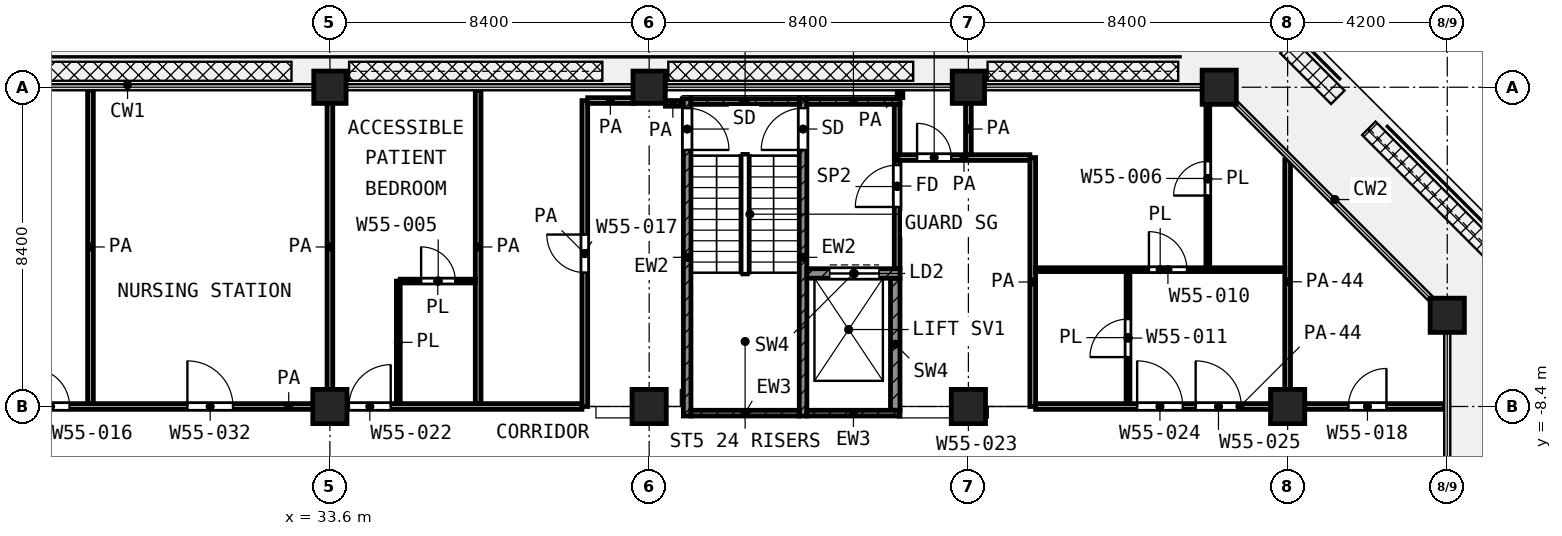
"""IFC4 building model, lengths in metres.
Left out: names, types, materials, properties, quantities, classifications, styles, units other than length and angle.
Written with IfcOpenShell. Run it as: python <this file> out.ifc"""

import sys

from ifc_helpers import new_model, si_unit, direction, frame, frame_2d, origin, origin_2d, place, context, subcontext, project, spatial, rectangle, extrude, element, fill, save


model = new_model("IFC4")
c1 = context("Model", 3, precision=1e-05, world=origin(), true_north=direction((0.0, 1.0)))
c2 = subcontext(c1, "Body", "Model", "MODEL_VIEW")
j1 = project(units=[si_unit("LENGTHUNIT", "METRE"), si_unit("PLANEANGLEUNIT", "RADIAN")], contexts=[c1])
p1 = place(None, origin())
s1 = spatial("IfcSite", under=j1, at=p1, CompositionType="ELEMENT")
p2 = place(p1, origin())
s2 = spatial("IfcBuilding", under=s1, at=p2, CompositionType="ELEMENT")
p3 = place(p2, frame((0.0, 0.0, 239.0)))
s3 = spatial("IfcBuildingStorey", under=s2, at=p3, CompositionType="ELEMENT", Elevation=239.0)
for number, where, z_axis, x_axis in (
    (1, (33.6, 0.0, 0.0), (0.0, 0.0, 1.0), (1.0, 0.0, 0.0)),
    (2, (42.0, 0.0, 0.0), (0.0, 0.0, 1.0), (1.0, 0.0, 0.0)),
    (3, (50.4, 0.0, 0.0), (0.0, 0.0, 1.0), (1.0, 0.0, 0.0)),
):
    element("IfcColumn", number, at=place(p3, frame(where, z_axis=z_axis, x_axis=x_axis)), inside=s3, PredefinedType="COLUMN", context=c2, shape_type="SweptSolid", body=[
        extrude(rectangle(XDim=0.85, YDim=0.85, at=origin_2d()), origin(), (0.0, 0.0, 1.0), 4.2),
    ])
for number, where, z_axis, x_axis in (
    (4, (57.0, 0.0, 0.0), (0.0, 0.0, 1.0), (1.0, 0.0, 0.0)),
    (5, (63.0, -6.0, 0.0), (0.0, 0.0, 1.0), (1.0, 0.0, 0.0)),
    (6, (33.6, -8.4, 0.0), (0.0, 0.0, 1.0), (1.0, 0.0, 0.0)),
    (7, (42.0, -8.4, 0.0), (0.0, 0.0, 1.0), (1.0, 0.0, 0.0)),
    (8, (50.4, -8.4, 0.0), (0.0, 0.0, 1.0), (1.0, 0.0, 0.0)),
    (9, (58.8, -8.4, 0.0), (0.0, 0.0, 1.0), (1.0, 0.0, 0.0)),
):
    element("IfcColumn", number, at=place(p3, frame(where, z_axis=z_axis, x_axis=x_axis)), inside=s3, PredefinedType="COLUMN", context=c2, shape_type="SweptSolid", body=[
        extrude(rectangle(XDim=0.9, YDim=0.9, at=origin_2d()), origin(), (0.0, 0.0, 1.0), 4.2),
    ])
p4 = place(p3, frame((43.0, -8.65, 0.0), z_axis=(0.0, 0.0, 1.0), x_axis=(0.0, 1.0, 0.0)))
e10 = element("IfcWall", 10, at=p4, inside=s3, PredefinedType="SHEAR", context=c2, shape_type="SweptSolid", body=[
    extrude(rectangle(XDim=8.35, YDim=0.2, at=frame_2d((4.175, 0.0))), origin(), (0.0, 0.0, 1.0), 3.6),
])
p5 = place(p4, frame((7.0, 0.0, 0.0)))
e11 = element("IfcOpeningElement", 11, at=p5, cuts=e10, PredefinedType="OPENING", context=c2, shape_type="SweptSolid", body=[
    extrude(rectangle(XDim=1.1, YDim=2.1, at=frame_2d((0.55, 1.05))), frame((0.0, 0.11, 0.0), z_axis=(0.0, -1.0, 0.0), x_axis=(1.0, 0.0, 0.0)), (0.0, 0.0, 1.0), 0.22),
])
p6 = place(p3, frame((46.05, -8.65, 0.0), z_axis=(0.0, 0.0, 1.0), x_axis=(0.0, 1.0, 0.0)))
e12 = element("IfcWall", 12, at=p6, inside=s3, PredefinedType="SHEAR", context=c2, shape_type="SweptSolid", body=[
    extrude(rectangle(XDim=8.35, YDim=0.2, at=frame_2d((4.175, 0.0))), origin(), (0.0, 0.0, 1.0), 3.6),
])
p7 = place(p6, frame((7.0, 0.0, 0.0)))
e13 = element("IfcOpeningElement", 13, at=p7, cuts=e12, PredefinedType="OPENING", context=c2, shape_type="SweptSolid", body=[
    extrude(rectangle(XDim=1.1, YDim=2.1, at=frame_2d((0.55, 1.05))), frame((0.0, 0.11, 0.0), z_axis=(0.0, -1.0, 0.0), x_axis=(1.0, 0.0, 0.0)), (0.0, 0.0, 1.0), 0.22),
])
p8 = place(p3, frame((43.1, -0.375, 0.0), z_axis=(0.0, 0.0, 1.0), x_axis=(1.0, 0.0, 0.0)))
e14 = element("IfcWall", 14, at=p8, inside=s3, PredefinedType="SHEAR", context=c2, shape_type="SweptSolid", body=[
    extrude(rectangle(XDim=2.85, YDim=0.15, at=frame_2d((1.425, 0.0))), origin(), (0.0, 0.0, 1.0), 3.6),
])
p9 = place(p3, frame((46.15, -0.375, 0.0), z_axis=(0.0, 0.0, 1.0), x_axis=(1.0, 0.0, 0.0)))
e15 = element("IfcWall", 15, at=p9, inside=s3, PredefinedType="SHEAR", context=c2, shape_type="SweptSolid", body=[
    extrude(rectangle(XDim=2.45, YDim=0.15, at=frame_2d((1.225, 0.0))), origin(), (0.0, 0.0, 1.0), 3.6),
])
p10 = place(p3, frame((43.1, -8.575, 0.0), z_axis=(0.0, 0.0, 1.0), x_axis=(1.0, 0.0, 0.0)))
e16 = element("IfcWall", 16, at=p10, inside=s3, PredefinedType="SHEAR", context=c2, shape_type="SweptSolid", body=[
    extrude(rectangle(XDim=2.85, YDim=0.15, at=frame_2d((1.425, 0.0))), origin(), (0.0, 0.0, 1.0), 3.6),
])
p11 = place(p3, frame((46.15, -8.575, 0.0), z_axis=(0.0, 0.0, 1.0), x_axis=(1.0, 0.0, 0.0)))
e17 = element("IfcWall", 17, at=p11, inside=s3, PredefinedType="SHEAR", context=c2, shape_type="SweptSolid", body=[
    extrude(rectangle(XDim=2.45, YDim=0.15, at=frame_2d((1.225, 0.0))), origin(), (0.0, 0.0, 1.0), 3.6),
])
p12 = place(p3, frame((46.15, -4.9, 0.0), z_axis=(0.0, 0.0, 1.0), x_axis=(1.0, 0.0, 0.0)))
e18 = element("IfcWall", 18, at=p12, inside=s3, PredefinedType="SHEAR", context=c2, shape_type="SweptSolid", body=[
    extrude(rectangle(XDim=2.45, YDim=0.25, at=frame_2d((1.225, 0.0))), origin(), (0.0, 0.0, 1.0), 3.6),
])
p13 = place(p12, frame((0.6, 0.0, 0.0)))
e19 = element("IfcOpeningElement", 19, at=p13, cuts=e18, PredefinedType="OPENING", context=c2, shape_type="SweptSolid", body=[
    extrude(rectangle(XDim=1.3, YDim=2.1, at=frame_2d((0.65, 1.05))), frame((0.0, 0.135, 0.0), z_axis=(0.0, -1.0, 0.0), x_axis=(1.0, 0.0, 0.0)), (0.0, 0.0, 1.0), 0.27),
])
p14 = place(p3, frame((48.475, -8.5, 0.0), z_axis=(0.0, 0.0, 1.0), x_axis=(0.0, 1.0, 0.0)))
e20 = element("IfcWall", 20, at=p14, inside=s3, PredefinedType="SHEAR", context=c2, shape_type="SweptSolid", body=[
    extrude(rectangle(XDim=3.475, YDim=0.25, at=frame_2d((1.738, 0.0))), origin(), (0.0, 0.0, 1.0), 3.6),
])
p15 = place(p3, frame((48.525, -4.775, 0.0), z_axis=(0.0, 0.0, 1.0), x_axis=(0.0, 1.0, 0.0)))
e21 = element("IfcWall", 21, at=p15, inside=s3, PredefinedType="PARTITIONING", context=c2, shape_type="SweptSolid", body=[
    extrude(rectangle(XDim=4.325, YDim=0.15, at=frame_2d((2.163, 0.0))), origin(), (0.0, 0.0, 1.0), 3.6),
])
p16 = place(p15, frame((1.625, 0.0, 0.0)))
e22 = element("IfcOpeningElement", 22, at=p16, cuts=e21, PredefinedType="OPENING", context=c2, shape_type="SweptSolid", body=[
    extrude(rectangle(XDim=1.1, YDim=2.1, at=frame_2d((0.55, 1.05))), frame((0.0, 0.085, 0.0), z_axis=(0.0, -1.0, 0.0), x_axis=(1.0, 0.0, 0.0)), (0.0, 0.0, 1.0), 0.17),
])
p17 = place(p3, frame((35.45, -5.1, 0.0), z_axis=(0.0, 0.0, 1.0), x_axis=(1.0, 0.0, 0.0)))
e23 = element("IfcWall", 23, at=p17, inside=s3, PredefinedType="PARTITIONING", context=c2, shape_type="SweptSolid", body=[
    extrude(rectangle(XDim=1.975, YDim=0.1, at=frame_2d((0.988, 0.0))), origin(), (0.0, 0.0, 1.0), 3.6),
])
p18 = place(p17, frame((0.55, 0.0, 0.0)))
e24 = element("IfcOpeningElement", 24, at=p18, cuts=e23, PredefinedType="OPENING", context=c2, shape_type="SweptSolid", body=[
    extrude(rectangle(XDim=0.9, YDim=2.1, at=frame_2d((0.45, 1.05))), frame((0.0, 0.06, 0.0), z_axis=(0.0, -1.0, 0.0), x_axis=(1.0, 0.0, 0.0)), (0.0, 0.0, 1.0), 0.12),
])
p19 = place(p3, frame((52.168, -4.8, 0.0), z_axis=(0.0, 0.0, 1.0), x_axis=(1.0, 0.0, 0.0)))
e25 = element("IfcWall", 25, at=p19, inside=s3, PredefinedType="PARTITIONING", context=c2, shape_type="SweptSolid", body=[
    extrude(rectangle(XDim=6.557, YDim=0.1, at=frame_2d((3.279, 0.0))), origin(), (0.0, 0.0, 1.0), 3.6),
])
p20 = place(p19, frame((2.982, 0.0, 0.0)))
e26 = element("IfcOpeningElement", 26, at=p20, cuts=e25, PredefinedType="OPENING", context=c2, shape_type="SweptSolid", body=[
    extrude(rectangle(XDim=1.0, YDim=2.1, at=frame_2d((0.5, 1.05))), frame((0.0, 0.06, 0.0), z_axis=(0.0, -1.0, 0.0), x_axis=(1.0, 0.0, 0.0)), (0.0, 0.0, 1.0), 0.12),
])
p21 = place(p3, frame((35.4, -8.325, 0.0), z_axis=(0.0, 0.0, 1.0), x_axis=(0.0, 1.0, 0.0)))
e27 = element("IfcWall", 27, at=p21, inside=s3, PredefinedType="PARTITIONING", context=c2, shape_type="SweptSolid", body=[
    extrude(rectangle(XDim=3.225, YDim=0.1, at=frame_2d((1.612, 0.0))), origin(), (0.0, 0.0, 1.0), 3.6),
])
p22 = place(p3, frame((54.6, -8.325, 0.0), z_axis=(0.0, 0.0, 1.0), x_axis=(0.0, 1.0, 0.0)))
e28 = element("IfcWall", 28, at=p22, inside=s3, PredefinedType="PARTITIONING", context=c2, shape_type="SweptSolid", body=[
    extrude(rectangle(XDim=3.475, YDim=0.1, at=frame_2d((1.737, 0.0))), origin(), (0.0, 0.0, 1.0), 3.6),
])
p23 = place(p22, frame((1.225, 0.0, 0.0)))
e29 = element("IfcOpeningElement", 29, at=p23, cuts=e28, PredefinedType="OPENING", context=c2, shape_type="SweptSolid", body=[
    extrude(rectangle(XDim=1.0, YDim=2.1, at=frame_2d((0.5, 1.05))), frame((0.0, 0.06, 0.0), z_axis=(0.0, -1.0, 0.0), x_axis=(1.0, 0.0, 0.0)), (0.0, 0.0, 1.0), 0.12),
])
p24 = place(p3, frame((56.7, -4.75, 0.0), z_axis=(0.0, 0.0, 1.0), x_axis=(0.0, 1.0, 0.0)))
e30 = element("IfcWall", 30, at=p24, inside=s3, PredefinedType="PARTITIONING", context=c2, shape_type="SweptSolid", body=[
    extrude(rectangle(XDim=4.67, YDim=0.1, at=frame_2d((2.335, 0.0))), origin(), (0.0, 0.0, 1.0), 3.6),
])
p25 = place(p24, frame((1.9, 0.0, 0.0)))
e31 = element("IfcOpeningElement", 31, at=p25, cuts=e30, PredefinedType="OPENING", context=c2, shape_type="SweptSolid", body=[
    extrude(rectangle(XDim=0.9, YDim=2.1, at=frame_2d((0.45, 1.05))), frame((0.0, 0.06, 0.0), z_axis=(0.0, -1.0, 0.0), x_axis=(1.0, 0.0, 0.0)), (0.0, 0.0, 1.0), 0.12),
])
p26 = place(p3, frame((24.8, -8.4, 0.0), z_axis=(0.0, 0.0, 1.0), x_axis=(1.0, 0.0, 0.0)))
e32 = element("IfcWall", 32, at=p26, inside=s3, PredefinedType="PARTITIONING", context=c2, shape_type="SweptSolid", body=[
    extrude(rectangle(XDim=15.432, YDim=0.15, at=frame_2d((7.716, 0.0))), origin(), (0.0, 0.0, 1.0), 3.6),
])
p27 = place(p26, frame((9.3, 0.0, 0.0)))
e33 = element("IfcOpeningElement", 33, at=p27, cuts=e32, PredefinedType="OPENING", context=c2, shape_type="SweptSolid", body=[
    extrude(rectangle(XDim=1.1, YDim=2.1, at=frame_2d((0.55, 1.05))), frame((0.0, 0.085, 0.0), z_axis=(0.0, -1.0, 0.0), x_axis=(1.0, 0.0, 0.0)), (0.0, 0.0, 1.0), 0.17),
])
p28 = place(p26, frame((0.95, 0.0, 0.0)))
e34 = element("IfcOpeningElement", 34, at=p28, cuts=e32, PredefinedType="OPENING", context=c2, shape_type="SweptSolid", body=[
    extrude(rectangle(XDim=1.0, YDim=2.1, at=frame_2d((0.5, 1.05))), frame((0.0, 0.085, 0.0), z_axis=(0.0, -1.0, 0.0), x_axis=(1.0, 0.0, 0.0)), (0.0, 0.0, 1.0), 0.17),
])
p29 = place(p26, frame((5.05, 0.0, 0.0)))
e35 = element("IfcOpeningElement", 35, at=p29, cuts=e32, PredefinedType="OPENING", context=c2, shape_type="SweptSolid", body=[
    extrude(rectangle(XDim=1.2, YDim=2.1, at=frame_2d((0.6, 1.05))), frame((0.0, 0.085, 0.0), z_axis=(0.0, -1.0, 0.0), x_axis=(1.0, 0.0, 0.0)), (0.0, 0.0, 1.0), 0.17),
])
p30 = place(p3, frame((52.168, -8.4, 0.0), z_axis=(0.0, 0.0, 1.0), x_axis=(1.0, 0.0, 0.0)))
e36 = element("IfcWall", 36, at=p30, inside=s3, PredefinedType="PARTITIONING", context=c2, shape_type="SweptSolid", body=[
    extrude(rectangle(XDim=10.752, YDim=0.15, at=frame_2d((5.376, 0.0))), origin(), (0.0, 0.0, 1.0), 2.7),
])
p31 = place(p30, frame((2.672, 0.0, 0.0)))
e37 = element("IfcOpeningElement", 37, at=p31, cuts=e36, PredefinedType="OPENING", context=c2, shape_type="SweptSolid", body=[
    extrude(rectangle(XDim=1.2, YDim=2.1, at=frame_2d((0.6, 1.05))), frame((0.0, 0.085, 0.0), z_axis=(0.0, -1.0, 0.0), x_axis=(1.0, 0.0, 0.0)), (0.0, 0.0, 1.0), 0.17),
])
p32 = place(p30, frame((4.212, 0.0, 0.0)))
e38 = element("IfcOpeningElement", 38, at=p32, cuts=e36, PredefinedType="OPENING", context=c2, shape_type="SweptSolid", body=[
    extrude(rectangle(XDim=1.2, YDim=2.1, at=frame_2d((0.6, 1.05))), frame((0.0, 0.085, 0.0), z_axis=(0.0, -1.0, 0.0), x_axis=(1.0, 0.0, 0.0)), (0.0, 0.0, 1.0), 0.17),
])
p33 = place(p30, frame((8.232, 0.0, 0.0)))
e39 = element("IfcOpeningElement", 39, at=p33, cuts=e36, PredefinedType="OPENING", context=c2, shape_type="SweptSolid", body=[
    extrude(rectangle(XDim=1.0, YDim=2.1, at=frame_2d((0.5, 1.05))), frame((0.0, 0.085, 0.0), z_axis=(0.0, -1.0, 0.0), x_axis=(1.0, 0.0, 0.0)), (0.0, 0.0, 1.0), 0.17),
])
p34 = place(p3, frame((48.55, -1.85, 0.0), z_axis=(0.0, 0.0, 1.0), x_axis=(1.0, 0.0, 0.0)))
e40 = element("IfcWall", 40, at=p34, inside=s3, PredefinedType="PARTITIONING", context=c2, shape_type="SweptSolid", body=[
    extrude(rectangle(XDim=3.468, YDim=0.15, at=frame_2d((1.734, 0.0))), origin(), (0.0, 0.0, 1.0), 3.6),
])
p35 = place(p34, frame((0.5, 0.0, 0.0)))
e41 = element("IfcOpeningElement", 41, at=p35, cuts=e40, PredefinedType="OPENING", context=c2, shape_type="SweptSolid", body=[
    extrude(rectangle(XDim=0.9, YDim=2.1, at=frame_2d((0.45, 1.05))), frame((0.0, 0.085, 0.0), z_axis=(0.0, -1.0, 0.0), x_axis=(1.0, 0.0, 0.0)), (0.0, 0.0, 1.0), 0.17),
])
p36 = place(p3, frame((42.427, -0.425, 0.0), z_axis=(0.0, 0.0, 1.0), x_axis=(1.0, 0.0, 0.0)))
e42 = element("IfcWall", 42, at=p36, inside=s3, PredefinedType="PARTITIONING", context=c2, shape_type="SweptSolid", body=[
    extrude(rectangle(XDim=0.393, YDim=0.15, at=frame_2d((0.197, 0.0))), origin(), (0.0, 0.0, 1.0), 3.6),
])
p37 = place(p3, frame((40.383, -0.35, 0.0), z_axis=(0.0, 0.0, 1.0), x_axis=(1.0, 0.0, 0.0)))
e43 = element("IfcWall", 43, at=p37, inside=s3, PredefinedType="PARTITIONING", context=c2, shape_type="SweptSolid", body=[
    extrude(rectangle(XDim=1.192, YDim=0.15, at=frame_2d((0.596, 0.0))), origin(), (0.0, 0.0, 1.0), 3.6),
])
for number, where, z_axis, x_axis in (
    (44, (27.3, -8.325, 0.0), (0.0, 0.0, 1.0), (0.0, 1.0, 0.0)),
    (45, (33.6, -8.325, 0.0), (0.0, 0.0, 1.0), (0.0, 1.0, 0.0)),
    (46, (37.5, -8.325, 0.0), (0.0, 0.0, 1.0), (0.0, 1.0, 0.0)),
):
    element("IfcWall", number, at=place(p3, frame(where, z_axis=z_axis, x_axis=x_axis)), inside=s3, PredefinedType="PARTITIONING", context=c2, shape_type="SweptSolid", body=[
        extrude(rectangle(XDim=8.245, YDim=0.15, at=frame_2d((4.123, 0.0))), origin(), (0.0, 0.0, 1.0), 3.6),
    ])
p38 = place(p3, frame((40.307, -8.4, 0.0), z_axis=(0.0, 0.0, 1.0), x_axis=(0.0, 1.0, 0.0)))
e47 = element("IfcWall", 47, at=p38, inside=s3, PredefinedType="PARTITIONING", context=c2, shape_type="SweptSolid", body=[
    extrude(rectangle(XDim=8.048, YDim=0.15, at=frame_2d((4.024, 0.0))), origin(), (0.0, 0.0, 1.0), 3.6),
])
p39 = place(p38, frame((3.524, 0.0, 0.0)))
e48 = element("IfcOpeningElement", 48, at=p39, cuts=e47, PredefinedType="OPENING", context=c2, shape_type="SweptSolid", body=[
    extrude(rectangle(XDim=1.0, YDim=2.1, at=frame_2d((0.5, 1.05))), frame((0.0, 0.085, 0.0), z_axis=(0.0, -1.0, 0.0), x_axis=(1.0, 0.0, 0.0)), (0.0, 0.0, 1.0), 0.17),
])
p40 = place(p3, frame((48.6, -0.27, 0.0), z_axis=(0.0, 0.0, 1.0), x_axis=(0.0, 1.0, 0.0)))
e49 = element("IfcWall", 49, at=p40, inside=s3, PredefinedType="PARTITIONING", context=c2, shape_type="SweptSolid", body=[
    extrude(rectangle(XDim=0.19, YDim=0.15, at=frame_2d((0.095, 0.0))), origin(), (0.0, 0.0, 1.0), 3.6),
])
p41 = place(p3, frame((50.4, -1.775, 0.0), z_axis=(0.0, 0.0, 1.0), x_axis=(0.0, 1.0, 0.0)))
e50 = element("IfcWall", 50, at=p41, inside=s3, PredefinedType="PARTITIONING", context=c2, shape_type="SweptSolid", body=[
    extrude(rectangle(XDim=1.35, YDim=0.15, at=frame_2d((0.675, 0.0))), origin(), (0.0, 0.0, 1.0), 3.6),
])
p42 = place(p3, frame((52.093, -8.4, 0.0), z_axis=(0.0, 0.0, 1.0), x_axis=(0.0, 1.0, 0.0)))
e51 = element("IfcWall", 51, at=p42, inside=s3, PredefinedType="PARTITIONING", context=c2, shape_type="SweptSolid", body=[
    extrude(rectangle(XDim=6.55, YDim=0.15, at=frame_2d((3.275, 0.0))), origin(), (0.0, 0.0, 1.0), 3.6),
])
p43 = place(p3, frame((58.8, -8.325, 0.0), z_axis=(0.0, 0.0, 1.0), x_axis=(0.0, 1.0, 0.0)))
e52 = element("IfcWall", 52, at=p43, inside=s3, PredefinedType="PARTITIONING", context=c2, shape_type="SweptSolid", body=[
    extrude(rectangle(XDim=6.412, YDim=0.15, at=frame_2d((3.206, 0.0))), origin(), (0.0, 0.0, 1.0), 2.7),
])
p44 = place(p5, frame((1.1, 0.0, 0.0), z_axis=(0.0, 0.0, 1.0), x_axis=(-1.0, 0.0, 0.0)))
e53 = element("IfcDoor", 53, at=p44, inside=s3, OperationType="SINGLE_SWING_LEFT", PredefinedType="DOOR", context=c2, shape_type="SweptSolid", body=[
    extrude(rectangle(XDim=1.1, YDim=2.1, at=frame_2d((0.55, 1.05))), frame((0.0, 0.025, 0.0), z_axis=(0.0, -1.0, 0.0), x_axis=(1.0, 0.0, 0.0)), (0.0, 0.0, 1.0), 0.05),
])
fill(e11, e53)
p45 = place(p7, origin())
e54 = element("IfcDoor", 54, at=p45, inside=s3, OperationType="SINGLE_SWING_LEFT", PredefinedType="DOOR", context=c2, shape_type="SweptSolid", body=[
    extrude(rectangle(XDim=1.1, YDim=2.1, at=frame_2d((0.55, 1.05))), frame((0.0, 0.025, 0.0), z_axis=(0.0, -1.0, 0.0), x_axis=(1.0, 0.0, 0.0)), (0.0, 0.0, 1.0), 0.05),
])
fill(e13, e54)
p46 = place(p13, origin())
e55 = element("IfcDoor", 55, at=p46, inside=s3, OperationType="DOUBLE_DOOR_SLIDING", PredefinedType="DOOR", context=c2, shape_type="SweptSolid", body=[
    extrude(rectangle(XDim=1.3, YDim=2.1, at=frame_2d((0.65, 1.05))), frame((0.0, 0.025, 0.0), z_axis=(0.0, -1.0, 0.0), x_axis=(1.0, 0.0, 0.0)), (0.0, 0.0, 1.0), 0.05),
])
fill(e19, e55)
p47 = place(p16, origin())
e56 = element("IfcDoor", 56, at=p47, inside=s3, OperationType="SINGLE_SWING_LEFT", PredefinedType="DOOR", context=c2, shape_type="SweptSolid", body=[
    extrude(rectangle(XDim=1.1, YDim=2.1, at=frame_2d((0.55, 1.05))), frame((0.0, 0.025, 0.0), z_axis=(0.0, -1.0, 0.0), x_axis=(1.0, 0.0, 0.0)), (0.0, 0.0, 1.0), 0.05),
])
fill(e22, e56)
p48 = place(p27, origin())
e57 = element("IfcDoor", 57, at=p48, inside=s3, OperationType="SINGLE_SWING_RIGHT", PredefinedType="DOOR", context=c2, shape_type="SweptSolid", body=[
    extrude(rectangle(XDim=1.1, YDim=2.1, at=frame_2d((0.55, 1.05))), frame((0.0, 0.025, 0.0), z_axis=(0.0, -1.0, 0.0), x_axis=(1.0, 0.0, 0.0)), (0.0, 0.0, 1.0), 0.05),
])
fill(e33, e57)
p49 = place(p18, origin())
e58 = element("IfcDoor", 58, at=p49, inside=s3, OperationType="SINGLE_SWING_LEFT", PredefinedType="DOOR", context=c2, shape_type="SweptSolid", body=[
    extrude(rectangle(XDim=0.9, YDim=2.1, at=frame_2d((0.45, 1.05))), frame((0.0, 0.025, 0.0), z_axis=(0.0, -1.0, 0.0), x_axis=(1.0, 0.0, 0.0)), (0.0, 0.0, 1.0), 0.05),
])
fill(e24, e58)
p50 = place(p39, origin())
e59 = element("IfcDoor", 59, at=p50, inside=s3, OperationType="SINGLE_SWING_RIGHT", PredefinedType="DOOR", context=c2, shape_type="SweptSolid", body=[
    extrude(rectangle(XDim=1.0, YDim=2.1, at=frame_2d((0.5, 1.05))), frame((0.0, 0.025, 0.0), z_axis=(0.0, -1.0, 0.0), x_axis=(1.0, 0.0, 0.0)), (0.0, 0.0, 1.0), 0.05),
])
fill(e48, e59)
p51 = place(p31, origin())
e60 = element("IfcDoor", 60, at=p51, inside=s3, OperationType="SINGLE_SWING_LEFT", PredefinedType="DOOR", context=c2, shape_type="SweptSolid", body=[
    extrude(rectangle(XDim=1.2, YDim=2.1, at=frame_2d((0.6, 1.05))), frame((0.0, 0.025, 0.0), z_axis=(0.0, -1.0, 0.0), x_axis=(1.0, 0.0, 0.0)), (0.0, 0.0, 1.0), 0.05),
])
fill(e37, e60)
p52 = place(p32, origin())
e61 = element("IfcDoor", 61, at=p52, inside=s3, OperationType="SINGLE_SWING_LEFT", PredefinedType="DOOR", context=c2, shape_type="SweptSolid", body=[
    extrude(rectangle(XDim=1.2, YDim=2.1, at=frame_2d((0.6, 1.05))), frame((0.0, 0.025, 0.0), z_axis=(0.0, -1.0, 0.0), x_axis=(1.0, 0.0, 0.0)), (0.0, 0.0, 1.0), 0.05),
])
fill(e38, e61)
p53 = place(p20, origin())
e62 = element("IfcDoor", 62, at=p53, inside=s3, OperationType="SINGLE_SWING_LEFT", PredefinedType="DOOR", context=c2, shape_type="SweptSolid", body=[
    extrude(rectangle(XDim=1.0, YDim=2.1, at=frame_2d((0.5, 1.05))), frame((0.0, 0.025, 0.0), z_axis=(0.0, -1.0, 0.0), x_axis=(1.0, 0.0, 0.0)), (0.0, 0.0, 1.0), 0.05),
])
fill(e26, e62)
p54 = place(p23, origin())
e63 = element("IfcDoor", 63, at=p54, inside=s3, OperationType="SINGLE_SWING_LEFT", PredefinedType="DOOR", context=c2, shape_type="SweptSolid", body=[
    extrude(rectangle(XDim=1.0, YDim=2.1, at=frame_2d((0.5, 1.05))), frame((0.0, 0.025, 0.0), z_axis=(0.0, -1.0, 0.0), x_axis=(1.0, 0.0, 0.0)), (0.0, 0.0, 1.0), 0.05),
])
fill(e29, e63)
p55 = place(p25, origin())
e64 = element("IfcDoor", 64, at=p55, inside=s3, OperationType="SINGLE_SWING_LEFT", PredefinedType="DOOR", context=c2, shape_type="SweptSolid", body=[
    extrude(rectangle(XDim=0.9, YDim=2.1, at=frame_2d((0.45, 1.05))), frame((0.0, 0.025, 0.0), z_axis=(0.0, -1.0, 0.0), x_axis=(1.0, 0.0, 0.0)), (0.0, 0.0, 1.0), 0.05),
])
fill(e31, e64)
p56 = place(p33, origin())
e65 = element("IfcDoor", 65, at=p56, inside=s3, OperationType="SINGLE_SWING_RIGHT", PredefinedType="DOOR", context=c2, shape_type="SweptSolid", body=[
    extrude(rectangle(XDim=1.0, YDim=2.1, at=frame_2d((0.5, 1.05))), frame((0.0, 0.025, 0.0), z_axis=(0.0, -1.0, 0.0), x_axis=(1.0, 0.0, 0.0)), (0.0, 0.0, 1.0), 0.05),
])
fill(e39, e65)
p57 = place(p35, origin())
e66 = element("IfcDoor", 66, at=p57, inside=s3, OperationType="SINGLE_SWING_LEFT", PredefinedType="DOOR", context=c2, shape_type="SweptSolid", body=[
    extrude(rectangle(XDim=0.9, YDim=2.1, at=frame_2d((0.45, 1.05))), frame((0.0, 0.025, 0.0), z_axis=(0.0, -1.0, 0.0), x_axis=(1.0, 0.0, 0.0)), (0.0, 0.0, 1.0), 0.05),
])
fill(e41, e66)
p58 = place(p28, origin())
e67 = element("IfcDoor", 67, at=p58, inside=s3, OperationType="SINGLE_SWING_LEFT", PredefinedType="DOOR", context=c2, shape_type="SweptSolid", body=[
    extrude(rectangle(XDim=1.0, YDim=2.1, at=frame_2d((0.5, 1.05))), frame((0.0, 0.025, 0.0), z_axis=(0.0, -1.0, 0.0), x_axis=(1.0, 0.0, 0.0)), (0.0, 0.0, 1.0), 0.05),
])
fill(e34, e67)
p59 = place(p29, origin())
e68 = element("IfcDoor", 68, at=p59, inside=s3, OperationType="SINGLE_SWING_LEFT", PredefinedType="DOOR", context=c2, shape_type="SweptSolid", body=[
    extrude(rectangle(XDim=1.2, YDim=2.1, at=frame_2d((0.6, 1.05))), frame((0.0, 0.025, 0.0), z_axis=(0.0, -1.0, 0.0), x_axis=(1.0, 0.0, 0.0)), (0.0, 0.0, 1.0), 0.05),
])
fill(e35, e68)
save(model, sys.argv[1])
